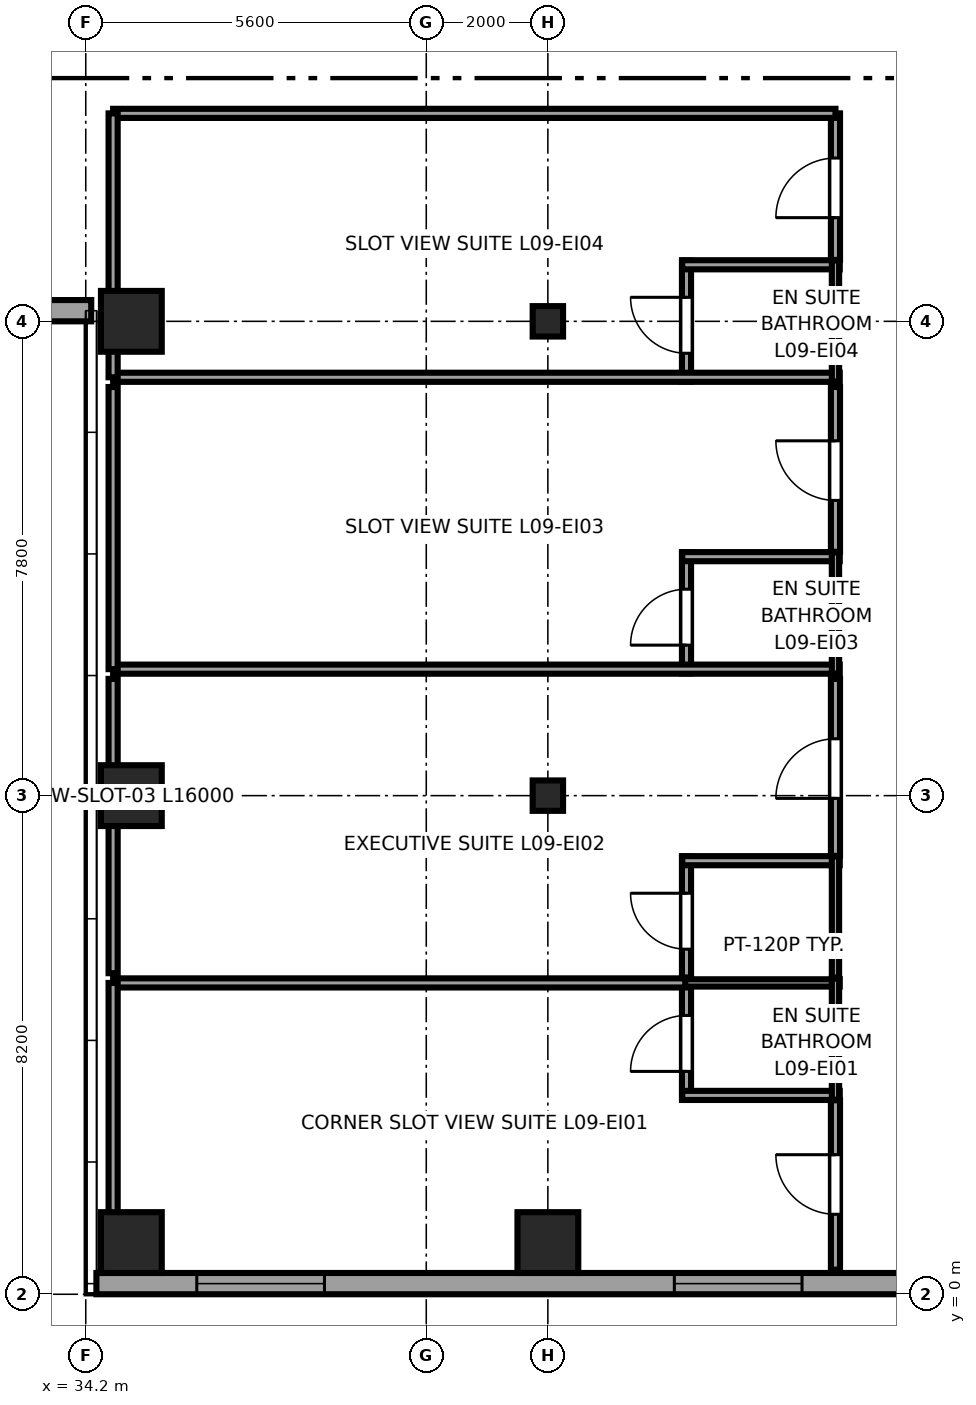
"""IFC4 building model, lengths in metres.
Left out: names, types, materials, properties, quantities, classifications, styles, units other than length and angle.
Written with IfcOpenShell. Run it as: python <this file> out.ifc"""

import sys

from ifc_helpers import new_model, si_unit, direction, frame, frame_2d, origin, origin_2d, place, context, subcontext, project, spatial, rectangle, i_section, extrude, source, transform, mapped, element, fill, save


model = new_model("IFC4")
c1 = context("Model", 3, precision=1e-05, world=origin(), true_north=direction((0.0, 1.0)))
c2 = subcontext(c1, "Body", "Model", "MODEL_VIEW")
j1 = project(units=[si_unit("LENGTHUNIT", "METRE"), si_unit("PLANEANGLEUNIT", "RADIAN")], contexts=[c1])
p1 = place(None, origin())
s1 = spatial("IfcSite", under=j1, at=p1, CompositionType="ELEMENT")
p2 = place(p1, origin())
s2 = spatial("IfcBuilding", under=s1, at=p2, CompositionType="ELEMENT")
p3 = place(p2, frame((0.0, 0.0, 42.65)))
s3 = spatial("IfcBuildingStorey", under=s2, at=p3, CompositionType="ELEMENT", Elevation=42.65)
m1 = source(origin(), c2, "Body", "SweptSolid", [
    extrude(rectangle(XDim=1.0, YDim=1.0, at=origin_2d()), origin(), (0.0, 0.0, 1.0), 3.55),
])
for number, where, z_axis, x_axis in (
    (1, (34.95, 0.85, 0.0), (0.0, 0.0, 1.0), (1.0, 0.0, 0.0)),
    (2, (34.95, 8.2, 0.0), (0.0, 0.0, 1.0), (1.0, 0.0, 0.0)),
    (3, (34.95, 16.0, 0.0), (0.0, 0.0, 1.0), (1.0, 0.0, 0.0)),
    (4, (41.8, 0.85, 0.0), (0.0, 0.0, 1.0), (1.0, 0.0, 0.0)),
):
    element("IfcColumn", number, at=place(p3, frame(where, z_axis=z_axis, x_axis=x_axis)), inside=s3, PredefinedType="COLUMN", context=c2, shape_type="MappedRepresentation", body=[
        mapped(m1, transform((0.0, 0.0, 0.0), x_axis=(1.0, 0.0, 0.0), y_axis=(0.0, 1.0, 0.0), z_axis=(0.0, 0.0, 1.0), scale=1.0)),
    ])
m2 = source(origin(), c2, "Body", "SweptSolid", [
    extrude(i_section(OverallWidth=0.5, OverallDepth=0.5, WebThickness=0.028, FlangeThickness=0.045, at=origin_2d()), origin(), (0.0, 0.0, 1.0), 3.55),
])
for number, where, z_axis, x_axis in (
    (5, (41.8, 8.2, 0.0), (0.0, 0.0, 1.0), (1.0, 0.0, 0.0)),
    (6, (41.8, 16.0, 0.0), (0.0, 0.0, 1.0), (1.0, 0.0, 0.0)),
):
    element("IfcColumn", number, at=place(p3, frame(where, z_axis=z_axis, x_axis=x_axis)), inside=s3, PredefinedType="COLUMN", context=c2, shape_type="MappedRepresentation", body=[
        mapped(m2, transform((0.0, 0.0, 0.0), x_axis=(1.0, 0.0, 0.0), y_axis=(0.0, 1.0, 0.0), z_axis=(0.0, 0.0, 1.0), scale=1.0)),
    ])
p4 = place(p3, frame((22.71, 16.175, 0.0), z_axis=(0.0, 0.0, 1.0), x_axis=(1.0, 0.0, 0.0)))
e7 = element("IfcWall", 7, at=p4, inside=s3, PredefinedType="SOLIDWALL", context=c2, shape_type="SweptSolid", body=[
    extrude(rectangle(XDim=11.58, YDim=0.35, at=frame_2d((5.79, 0.0))), origin(), (0.0, 0.0, 1.0), 2.748),
])
p5 = place(p4, frame((2.145, 0.0, 0.68)))
e8 = element("IfcOpeningElement", 8, at=p5, cuts=e7, PredefinedType="OPENING", context=c2, shape_type="SweptSolid", body=[
    extrude(rectangle(XDim=2.1, YDim=1.9, at=frame_2d((1.05, 0.95))), frame((0.0, 0.185, 0.0), z_axis=(0.0, -1.0, 0.0), x_axis=(1.0, 0.0, 0.0)), (0.0, 0.0, 1.0), 0.37),
])
p6 = place(p4, frame((7.335, 0.0, 0.68)))
e9 = element("IfcOpeningElement", 9, at=p6, cuts=e7, PredefinedType="OPENING", context=c2, shape_type="SweptSolid", body=[
    extrude(rectangle(XDim=2.1, YDim=1.9, at=frame_2d((1.05, 0.95))), frame((0.0, 0.185, 0.0), z_axis=(0.0, -1.0, 0.0), x_axis=(1.0, 0.0, 0.0)), (0.0, 0.0, 1.0), 0.37),
])
p7 = place(p3, frame((34.375, 0.175, 0.0), z_axis=(0.0, 0.0, 1.0), x_axis=(1.0, 0.0, 0.0)))
e10 = element("IfcWall", 10, at=p7, inside=s3, PredefinedType="SOLIDWALL", context=c2, shape_type="SweptSolid", body=[
    extrude(rectangle(XDim=18.008, YDim=0.35, at=frame_2d((9.004, 0.0))), origin(), (0.0, 0.0, 1.0), 3.37),
])
p8 = place(p7, frame((1.651, 0.0, 0.68)))
e11 = element("IfcOpeningElement", 11, at=p8, cuts=e10, PredefinedType="OPENING", context=c2, shape_type="SweptSolid", body=[
    extrude(rectangle(XDim=2.1, YDim=1.9, at=frame_2d((1.05, 0.95))), frame((0.0, 0.185, 0.0), z_axis=(0.0, -1.0, 0.0), x_axis=(1.0, 0.0, 0.0)), (0.0, 0.0, 1.0), 0.37),
])
p9 = place(p7, frame((9.505, 0.0, 0.68)))
e12 = element("IfcOpeningElement", 12, at=p9, cuts=e10, PredefinedType="OPENING", context=c2, shape_type="SweptSolid", body=[
    extrude(rectangle(XDim=2.1, YDim=1.9, at=frame_2d((1.05, 0.95))), frame((0.0, 0.185, 0.0), z_axis=(0.0, -1.0, 0.0), x_axis=(1.0, 0.0, 0.0)), (0.0, 0.0, 1.0), 0.37),
])
p10 = place(p7, frame((15.725, 0.0, 0.62)))
e13 = element("IfcOpeningElement", 13, at=p10, cuts=e10, PredefinedType="OPENING", context=c2, shape_type="SweptSolid", body=[
    extrude(rectangle(XDim=1.5, YDim=1.55, at=frame_2d((0.75, 0.775))), frame((0.0, 0.185, 0.0), z_axis=(0.0, -1.0, 0.0), x_axis=(1.0, 0.0, 0.0)), (0.0, 0.0, 1.0), 0.37),
])
p11 = place(p3, frame((44.08, 3.2, 0.0), z_axis=(0.0, 0.0, 1.0), x_axis=(0.0, 1.0, 0.0)))
e14 = element("IfcWall", 14, at=p11, inside=s3, PredefinedType="PARTITIONING", context=c2, shape_type="SweptSolid", body=[
    extrude(rectangle(XDim=1.99, YDim=0.15, at=frame_2d((0.995, 0.0))), origin(), (0.0, 0.0, 1.0), 3.37),
])
p12 = place(p11, frame((0.465, 0.0, 0.0)))
e15 = element("IfcOpeningElement", 15, at=p12, cuts=e14, PredefinedType="OPENING", context=c2, shape_type="SweptSolid", body=[
    extrude(rectangle(XDim=0.92, YDim=2.01, at=frame_2d((0.46, 1.005))), frame((0.0, 0.085, 0.0), z_axis=(0.0, -1.0, 0.0), x_axis=(1.0, 0.0, 0.0)), (0.0, 0.0, 1.0), 0.17),
])
p13 = place(p3, frame((44.01, 3.27, 0.0), z_axis=(0.0, 0.0, 1.0), x_axis=(1.0, 0.0, 0.0)))
e16 = element("IfcWall", 16, at=p13, inside=s3, PredefinedType="PARTITIONING", context=c2, shape_type="SweptSolid", body=[
    extrude(rectangle(XDim=2.59, YDim=0.15, at=frame_2d((1.295, 0.0))), origin(), (0.0, 0.0, 1.0), 3.37),
])
p14 = place(p3, frame((44.01, 5.12, 0.0), z_axis=(0.0, 0.0, 1.0), x_axis=(1.0, 0.0, 0.0)))
e17 = element("IfcWall", 17, at=p14, inside=s3, PredefinedType="PLUMBINGWALL", context=c2, shape_type="SweptSolid", body=[
    extrude(rectangle(XDim=2.59, YDim=0.12, at=frame_2d((1.295, 0.0))), origin(), (0.0, 0.0, 1.0), 3.37),
])
p15 = place(p3, frame((46.53, 3.2, 0.0), z_axis=(0.0, 0.0, 1.0), x_axis=(0.0, 1.0, 0.0)))
e18 = element("IfcWall", 18, at=p15, inside=s3, PredefinedType="PLUMBINGWALL", context=c2, shape_type="SweptSolid", body=[
    extrude(rectangle(XDim=1.99, YDim=0.12, at=frame_2d((0.995, 0.0))), origin(), (0.0, 0.0, 1.0), 3.37),
])
p16 = place(p3, frame((44.08, 5.21, 0.0), z_axis=(0.0, 0.0, 1.0), x_axis=(0.0, 1.0, 0.0)))
e19 = element("IfcWall", 19, at=p16, inside=s3, PredefinedType="PARTITIONING", context=c2, shape_type="SweptSolid", body=[
    extrude(rectangle(XDim=1.99, YDim=0.15, at=frame_2d((0.995, 0.0))), origin(), (0.0, 0.0, 1.0), 3.37),
])
p17 = place(p16, frame((0.465, 0.0, 0.0)))
e20 = element("IfcOpeningElement", 20, at=p17, cuts=e19, PredefinedType="OPENING", context=c2, shape_type="SweptSolid", body=[
    extrude(rectangle(XDim=0.92, YDim=2.01, at=frame_2d((0.46, 1.005))), frame((0.0, 0.085, 0.0), z_axis=(0.0, -1.0, 0.0), x_axis=(1.0, 0.0, 0.0)), (0.0, 0.0, 1.0), 0.17),
])
p18 = place(p3, frame((44.01, 7.13, 0.0), z_axis=(0.0, 0.0, 1.0), x_axis=(1.0, 0.0, 0.0)))
e21 = element("IfcWall", 21, at=p18, inside=s3, PredefinedType="PARTITIONING", context=c2, shape_type="SweptSolid", body=[
    extrude(rectangle(XDim=2.59, YDim=0.15, at=frame_2d((1.295, 0.0))), origin(), (0.0, 0.0, 1.0), 3.37),
])
p19 = place(p3, frame((46.53, 5.21, 0.0), z_axis=(0.0, 0.0, 1.0), x_axis=(0.0, 1.0, 0.0)))
e22 = element("IfcWall", 22, at=p19, inside=s3, PredefinedType="PLUMBINGWALL", context=c2, shape_type="SweptSolid", body=[
    extrude(rectangle(XDim=1.99, YDim=0.12, at=frame_2d((0.995, 0.0))), origin(), (0.0, 0.0, 1.0), 3.37),
])
p20 = place(p3, frame((44.08, 10.21, 0.0), z_axis=(0.0, 0.0, 1.0), x_axis=(0.0, 1.0, 0.0)))
e23 = element("IfcWall", 23, at=p20, inside=s3, PredefinedType="PARTITIONING", context=c2, shape_type="SweptSolid", body=[
    extrude(rectangle(XDim=1.99, YDim=0.15, at=frame_2d((0.995, 0.0))), origin(), (0.0, 0.0, 1.0), 3.37),
])
p21 = place(p20, frame((0.465, 0.0, 0.0)))
e24 = element("IfcOpeningElement", 24, at=p21, cuts=e23, PredefinedType="OPENING", context=c2, shape_type="SweptSolid", body=[
    extrude(rectangle(XDim=0.92, YDim=2.01, at=frame_2d((0.46, 1.005))), frame((0.0, 0.085, 0.0), z_axis=(0.0, -1.0, 0.0), x_axis=(1.0, 0.0, 0.0)), (0.0, 0.0, 1.0), 0.17),
])
p22 = place(p3, frame((34.65, 10.28, 0.0), z_axis=(0.0, 0.0, 1.0), x_axis=(1.0, 0.0, 0.0)))
e25 = element("IfcWall", 25, at=p22, inside=s3, PredefinedType="PARTITIONING", context=c2, shape_type="SweptSolid", body=[
    extrude(rectangle(XDim=11.95, YDim=0.15, at=frame_2d((5.975, 0.0))), origin(), (0.0, 0.0, 1.0), 3.37),
])
p23 = place(p3, frame((44.01, 12.13, 0.0), z_axis=(0.0, 0.0, 1.0), x_axis=(1.0, 0.0, 0.0)))
e26 = element("IfcWall", 26, at=p23, inside=s3, PredefinedType="PARTITIONING", context=c2, shape_type="SweptSolid", body=[
    extrude(rectangle(XDim=2.59, YDim=0.15, at=frame_2d((1.295, 0.0))), origin(), (0.0, 0.0, 1.0), 3.37),
])
p24 = place(p3, frame((46.53, 10.21, 0.0), z_axis=(0.0, 0.0, 1.0), x_axis=(0.0, 1.0, 0.0)))
e27 = element("IfcWall", 27, at=p24, inside=s3, PredefinedType="PLUMBINGWALL", context=c2, shape_type="SweptSolid", body=[
    extrude(rectangle(XDim=1.99, YDim=0.12, at=frame_2d((0.995, 0.0))), origin(), (0.0, 0.0, 1.0), 3.37),
])
p25 = place(p3, frame((44.08, 15.01, 0.0), z_axis=(0.0, 0.0, 1.0), x_axis=(0.0, 1.0, 0.0)))
e28 = element("IfcWall", 28, at=p25, inside=s3, PredefinedType="PARTITIONING", context=c2, shape_type="SweptSolid", body=[
    extrude(rectangle(XDim=1.99, YDim=0.15, at=frame_2d((0.995, 0.0))), origin(), (0.0, 0.0, 1.0), 3.37),
])
p26 = place(p25, frame((0.465, 0.0, 0.0)))
e29 = element("IfcOpeningElement", 29, at=p26, cuts=e28, PredefinedType="OPENING", context=c2, shape_type="SweptSolid", body=[
    extrude(rectangle(XDim=0.92, YDim=2.01, at=frame_2d((0.46, 1.005))), frame((0.0, 0.085, 0.0), z_axis=(0.0, -1.0, 0.0), x_axis=(1.0, 0.0, 0.0)), (0.0, 0.0, 1.0), 0.17),
])
p27 = place(p3, frame((34.65, 15.08, 0.0), z_axis=(0.0, 0.0, 1.0), x_axis=(1.0, 0.0, 0.0)))
e30 = element("IfcWall", 30, at=p27, inside=s3, PredefinedType="PARTITIONING", context=c2, shape_type="SweptSolid", body=[
    extrude(rectangle(XDim=11.95, YDim=0.15, at=frame_2d((5.975, 0.0))), origin(), (0.0, 0.0, 1.0), 3.37),
])
p28 = place(p3, frame((44.01, 16.93, 0.0), z_axis=(0.0, 0.0, 1.0), x_axis=(1.0, 0.0, 0.0)))
e31 = element("IfcWall", 31, at=p28, inside=s3, PredefinedType="PARTITIONING", context=c2, shape_type="SweptSolid", body=[
    extrude(rectangle(XDim=2.59, YDim=0.15, at=frame_2d((1.295, 0.0))), origin(), (0.0, 0.0, 1.0), 3.37),
])
p29 = place(p3, frame((46.53, 15.01, 0.0), z_axis=(0.0, 0.0, 1.0), x_axis=(0.0, 1.0, 0.0)))
e32 = element("IfcWall", 32, at=p29, inside=s3, PredefinedType="PLUMBINGWALL", context=c2, shape_type="SweptSolid", body=[
    extrude(rectangle(XDim=1.99, YDim=0.12, at=frame_2d((0.995, 0.0))), origin(), (0.0, 0.0, 1.0), 3.37),
])
p30 = place(p3, frame((46.53, 0.405, 0.0), z_axis=(0.0, 0.0, 1.0), x_axis=(0.0, 1.0, 0.0)))
e33 = element("IfcWall", 33, at=p30, inside=s3, PredefinedType="PARTITIONING", context=c2, shape_type="SweptSolid", body=[
    extrude(rectangle(XDim=2.785, YDim=0.15, at=frame_2d((1.393, 0.0))), origin(), (0.0, 0.0, 1.0), 3.37),
])
p31 = place(p30, frame((0.91, 0.0, 0.0)))
e34 = element("IfcOpeningElement", 34, at=p31, cuts=e33, PredefinedType="OPENING", context=c2, shape_type="SweptSolid", body=[
    extrude(rectangle(XDim=0.98, YDim=2.12, at=frame_2d((0.49, 1.06))), frame((0.0, 0.085, 0.0), z_axis=(0.0, -1.0, 0.0), x_axis=(1.0, 0.0, 0.0)), (0.0, 0.0, 1.0), 0.17),
])
p32 = place(p3, frame((34.65, 5.12, 0.0), z_axis=(0.0, 0.0, 1.0), x_axis=(1.0, 0.0, 0.0)))
e35 = element("IfcWall", 35, at=p32, inside=s3, PredefinedType="PARTITIONING", context=c2, shape_type="SweptSolid", body=[
    extrude(rectangle(XDim=9.41, YDim=0.15, at=frame_2d((4.705, 0.0))), origin(), (0.0, 0.0, 1.0), 3.37),
])
p33 = place(p3, frame((34.65, 0.405, 0.0), z_axis=(0.0, 0.0, 1.0), x_axis=(0.0, 1.0, 0.0)))
e36 = element("IfcWall", 36, at=p33, inside=s3, PredefinedType="PARTITIONING", context=c2, shape_type="SweptSolid", body=[
    extrude(rectangle(XDim=4.715, YDim=0.15, at=frame_2d((2.357, 0.0))), origin(), (0.0, 0.0, 1.0), 3.37),
])
p34 = place(p3, frame((46.53, 7.21, 0.0), z_axis=(0.0, 0.0, 1.0), x_axis=(0.0, 1.0, 0.0)))
e37 = element("IfcWall", 37, at=p34, inside=s3, PredefinedType="PARTITIONING", context=c2, shape_type="SweptSolid", body=[
    extrude(rectangle(XDim=2.91, YDim=0.15, at=frame_2d((1.455, 0.0))), origin(), (0.0, 0.0, 1.0), 3.37),
])
p35 = place(p34, frame((0.945, 0.0, 0.0)))
e38 = element("IfcOpeningElement", 38, at=p35, cuts=e37, PredefinedType="OPENING", context=c2, shape_type="SweptSolid", body=[
    extrude(rectangle(XDim=0.98, YDim=2.12, at=frame_2d((0.49, 1.06))), frame((0.0, 0.085, 0.0), z_axis=(0.0, -1.0, 0.0), x_axis=(1.0, 0.0, 0.0)), (0.0, 0.0, 1.0), 0.17),
])
p36 = place(p3, frame((34.65, 5.28, 0.0), z_axis=(0.0, 0.0, 1.0), x_axis=(0.0, 1.0, 0.0)))
e39 = element("IfcWall", 39, at=p36, inside=s3, PredefinedType="PARTITIONING", context=c2, shape_type="SweptSolid", body=[
    extrude(rectangle(XDim=4.84, YDim=0.15, at=frame_2d((2.42, 0.0))), origin(), (0.0, 0.0, 1.0), 3.37),
])
p37 = place(p3, frame((46.53, 12.21, 0.0), z_axis=(0.0, 0.0, 1.0), x_axis=(0.0, 1.0, 0.0)))
e40 = element("IfcWall", 40, at=p37, inside=s3, PredefinedType="PARTITIONING", context=c2, shape_type="SweptSolid", body=[
    extrude(rectangle(XDim=2.71, YDim=0.15, at=frame_2d((1.355, 0.0))), origin(), (0.0, 0.0, 1.0), 3.37),
])
p38 = place(p37, frame((0.845, 0.0, 0.0)))
e41 = element("IfcOpeningElement", 41, at=p38, cuts=e40, PredefinedType="OPENING", context=c2, shape_type="SweptSolid", body=[
    extrude(rectangle(XDim=0.98, YDim=2.12, at=frame_2d((0.49, 1.06))), frame((0.0, 0.085, 0.0), z_axis=(0.0, -1.0, 0.0), x_axis=(1.0, 0.0, 0.0)), (0.0, 0.0, 1.0), 0.17),
])
p39 = place(p3, frame((34.65, 10.28, 0.0), z_axis=(0.0, 0.0, 1.0), x_axis=(0.0, 1.0, 0.0)))
e42 = element("IfcWall", 42, at=p39, inside=s3, PredefinedType="PARTITIONING", context=c2, shape_type="SweptSolid", body=[
    extrude(rectangle(XDim=4.64, YDim=0.15, at=frame_2d((2.32, 0.0))), origin(), (0.0, 0.0, 1.0), 3.37),
])
p40 = place(p3, frame((46.53, 17.01, 0.0), z_axis=(0.0, 0.0, 1.0), x_axis=(0.0, 1.0, 0.0)))
e43 = element("IfcWall", 43, at=p40, inside=s3, PredefinedType="PARTITIONING", context=c2, shape_type="SweptSolid", body=[
    extrude(rectangle(XDim=2.41, YDim=0.15, at=frame_2d((1.205, 0.0))), origin(), (0.0, 0.0, 1.0), 3.37),
])
p41 = place(p40, frame((0.695, 0.0, 0.0)))
e44 = element("IfcOpeningElement", 44, at=p41, cuts=e43, PredefinedType="OPENING", context=c2, shape_type="SweptSolid", body=[
    extrude(rectangle(XDim=0.98, YDim=2.12, at=frame_2d((0.49, 1.06))), frame((0.0, 0.085, 0.0), z_axis=(0.0, -1.0, 0.0), x_axis=(1.0, 0.0, 0.0)), (0.0, 0.0, 1.0), 0.17),
])
p42 = place(p3, frame((34.65, 19.42, 0.0), z_axis=(0.0, 0.0, 1.0), x_axis=(1.0, 0.0, 0.0)))
e45 = element("IfcWall", 45, at=p42, inside=s3, PredefinedType="PARTITIONING", context=c2, shape_type="SweptSolid", body=[
    extrude(rectangle(XDim=11.88, YDim=0.15, at=frame_2d((5.94, 0.0))), origin(), (0.0, 0.0, 1.0), 3.37),
])
p43 = place(p3, frame((34.65, 15.08, 0.0), z_axis=(0.0, 0.0, 1.0), x_axis=(0.0, 1.0, 0.0)))
e46 = element("IfcWall", 46, at=p43, inside=s3, PredefinedType="PARTITIONING", context=c2, shape_type="SweptSolid", body=[
    extrude(rectangle(XDim=4.34, YDim=0.15, at=frame_2d((2.17, 0.0))), origin(), (0.0, 0.0, 1.0), 3.37),
])
m3 = source(origin(), c2, "Body", "SweptSolid", [
    extrude(rectangle(XDim=2.1, YDim=1.9, at=frame_2d((1.05, 0.95))), frame((0.0, 0.09, 0.0), z_axis=(0.0, -1.0, 0.0), x_axis=(1.0, 0.0, 0.0)), (0.0, 0.0, 1.0), 0.06),
])
p44 = place(p8, origin())
e47 = element("IfcWindow", 47, at=p44, inside=s3, PartitioningType="TRIPLE_PANEL_HORIZONTAL", PredefinedType="WINDOW", context=c2, shape_type="MappedRepresentation", body=[
    mapped(m3, transform((0.0, 0.0, 0.0), x_axis=(1.0, 0.0, 0.0), y_axis=(0.0, 1.0, 0.0), z_axis=(0.0, 0.0, 1.0), scale=1.0)),
])
fill(e11, e47)
p45 = place(p9, origin())
e48 = element("IfcWindow", 48, at=p45, inside=s3, PartitioningType="TRIPLE_PANEL_HORIZONTAL", PredefinedType="WINDOW", context=c2, shape_type="MappedRepresentation", body=[
    mapped(m3, transform((0.0, 0.0, 0.0), x_axis=(1.0, 0.0, 0.0), y_axis=(0.0, 1.0, 0.0), z_axis=(0.0, 0.0, 1.0), scale=1.0)),
])
fill(e12, e48)
m4 = source(origin(), c2, "Body", "SweptSolid", [
    extrude(rectangle(XDim=0.92, YDim=2.01, at=frame_2d((0.46, 1.005))), frame((0.0, 0.025, 0.0), z_axis=(0.0, -1.0, 0.0), x_axis=(1.0, 0.0, 0.0)), (0.0, 0.0, 1.0), 0.05),
])
p46 = place(p12, origin())
e49 = element("IfcDoor", 49, at=p46, inside=s3, OperationType="SINGLE_SWING_LEFT", PredefinedType="DOOR", context=c2, shape_type="MappedRepresentation", body=[
    mapped(m4, transform((0.0, 0.0, 0.0), x_axis=(1.0, 0.0, 0.0), y_axis=(0.0, 1.0, 0.0), z_axis=(0.0, 0.0, 1.0), scale=1.0)),
])
fill(e15, e49)
p47 = place(p17, origin())
e50 = element("IfcDoor", 50, at=p47, inside=s3, OperationType="SINGLE_SWING_RIGHT", PredefinedType="DOOR", context=c2, shape_type="MappedRepresentation", body=[
    mapped(m4, transform((0.0, 0.0, 0.0), x_axis=(1.0, 0.0, 0.0), y_axis=(0.0, 1.0, 0.0), z_axis=(0.0, 0.0, 1.0), scale=1.0)),
])
fill(e20, e50)
p48 = place(p21, origin())
e51 = element("IfcDoor", 51, at=p48, inside=s3, OperationType="SINGLE_SWING_LEFT", PredefinedType="DOOR", context=c2, shape_type="MappedRepresentation", body=[
    mapped(m4, transform((0.0, 0.0, 0.0), x_axis=(1.0, 0.0, 0.0), y_axis=(0.0, 1.0, 0.0), z_axis=(0.0, 0.0, 1.0), scale=1.0)),
])
fill(e24, e51)
p49 = place(p26, origin())
e52 = element("IfcDoor", 52, at=p49, inside=s3, OperationType="SINGLE_SWING_RIGHT", PredefinedType="DOOR", context=c2, shape_type="MappedRepresentation", body=[
    mapped(m4, transform((0.0, 0.0, 0.0), x_axis=(1.0, 0.0, 0.0), y_axis=(0.0, 1.0, 0.0), z_axis=(0.0, 0.0, 1.0), scale=1.0)),
])
fill(e29, e52)
m5 = source(origin(), c2, "Body", "SweptSolid", [
    extrude(rectangle(XDim=0.98, YDim=2.12, at=frame_2d((0.49, 1.06))), frame((0.0, 0.025, 0.0), z_axis=(0.0, -1.0, 0.0), x_axis=(1.0, 0.0, 0.0)), (0.0, 0.0, 1.0), 0.05),
])
p50 = place(p31, origin())
e53 = element("IfcDoor", 53, at=p50, inside=s3, OperationType="SINGLE_SWING_RIGHT", PredefinedType="DOOR", context=c2, shape_type="MappedRepresentation", body=[
    mapped(m5, transform((0.0, 0.0, 0.0), x_axis=(1.0, 0.0, 0.0), y_axis=(0.0, 1.0, 0.0), z_axis=(0.0, 0.0, 1.0), scale=1.0)),
])
fill(e34, e53)
p51 = place(p35, origin())
e54 = element("IfcDoor", 54, at=p51, inside=s3, OperationType="SINGLE_SWING_LEFT", PredefinedType="DOOR", context=c2, shape_type="MappedRepresentation", body=[
    mapped(m5, transform((0.0, 0.0, 0.0), x_axis=(1.0, 0.0, 0.0), y_axis=(0.0, 1.0, 0.0), z_axis=(0.0, 0.0, 1.0), scale=1.0)),
])
fill(e38, e54)
p52 = place(p38, origin())
e55 = element("IfcDoor", 55, at=p52, inside=s3, OperationType="SINGLE_SWING_RIGHT", PredefinedType="DOOR", context=c2, shape_type="MappedRepresentation", body=[
    mapped(m5, transform((0.0, 0.0, 0.0), x_axis=(1.0, 0.0, 0.0), y_axis=(0.0, 1.0, 0.0), z_axis=(0.0, 0.0, 1.0), scale=1.0)),
])
fill(e41, e55)
p53 = place(p41, origin())
e56 = element("IfcDoor", 56, at=p53, inside=s3, OperationType="SINGLE_SWING_LEFT", PredefinedType="DOOR", context=c2, shape_type="MappedRepresentation", body=[
    mapped(m5, transform((0.0, 0.0, 0.0), x_axis=(1.0, 0.0, 0.0), y_axis=(0.0, 1.0, 0.0), z_axis=(0.0, 0.0, 1.0), scale=1.0)),
])
fill(e44, e56)
save(model, sys.argv[1])
